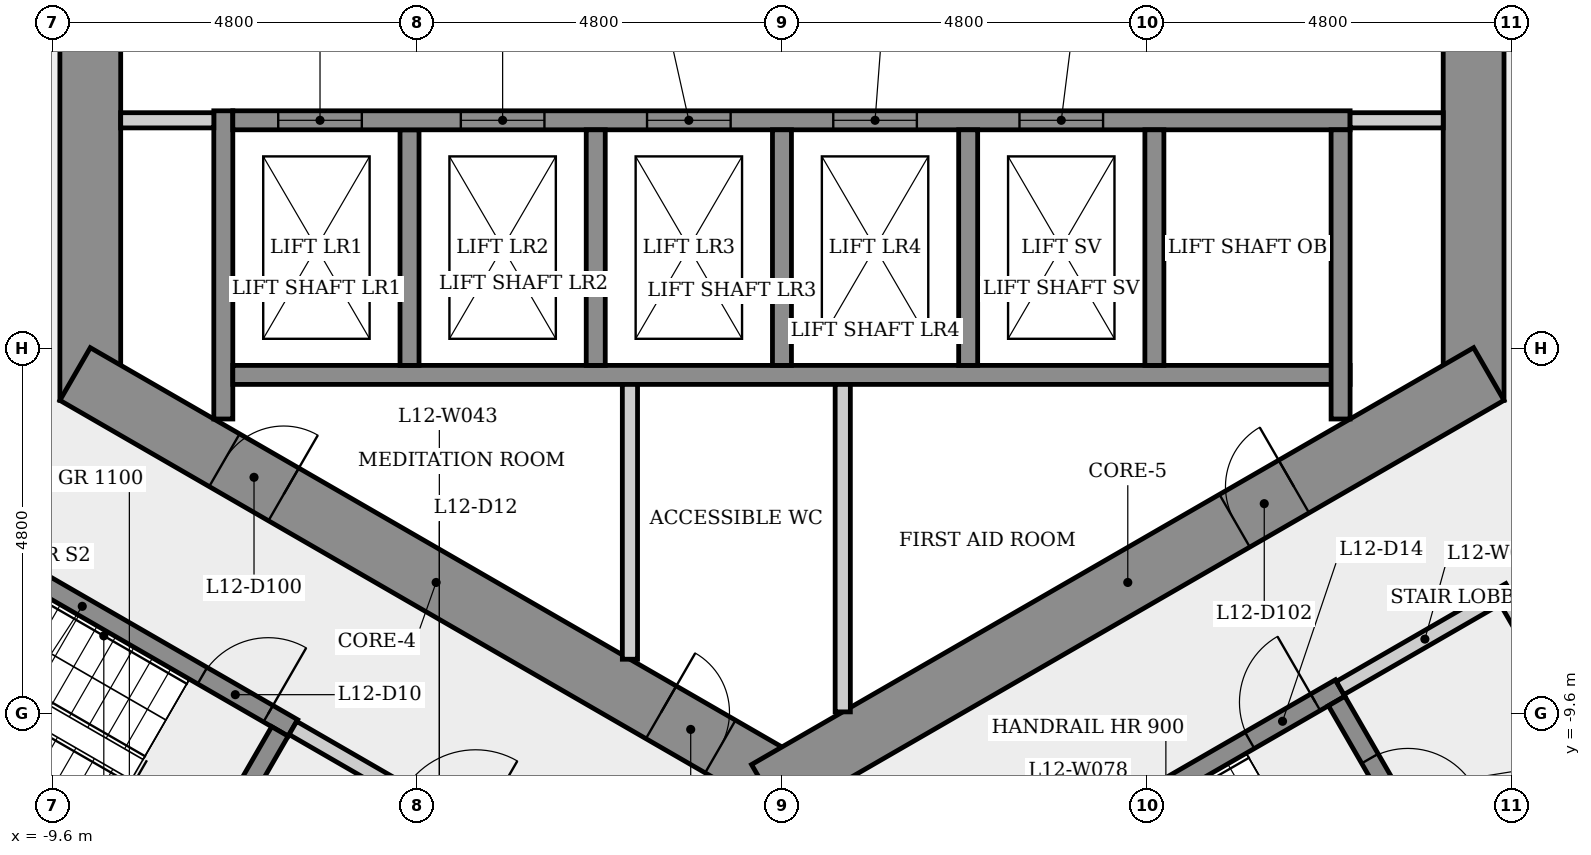
"""IFC4 building model, lengths in metres.
Left out: names, types, materials, properties, quantities, classifications, styles, units other than length and angle.
Written with IfcOpenShell. Run it as: python <this file> out.ifc"""

import sys

from ifc_helpers import new_model, si_unit, direction, frame, frame_2d, origin, place, context, subcontext, project, spatial, rectangle, extrude, element, fill, save


model = new_model("IFC4")
c1 = context("Model", 3, precision=1e-05, world=origin(), true_north=direction((0.0, 1.0)))
c2 = subcontext(c1, "Body", "Model", "MODEL_VIEW")
j1 = project(units=[si_unit("LENGTHUNIT", "METRE"), si_unit("PLANEANGLEUNIT", "RADIAN")], contexts=[c1])
p1 = place(None, origin())
s1 = spatial("IfcSite", under=j1, at=p1, CompositionType="ELEMENT")
p2 = place(p1, origin())
s2 = spatial("IfcBuilding", under=s1, at=p2, CompositionType="ELEMENT")
p3 = place(p2, frame((0.0, 0.0, 49.3)))
s3 = spatial("IfcBuildingStorey", under=s2, at=p3, CompositionType="ELEMENT", Elevation=49.3)
p4 = place(p3, frame((9.1, -5.485, 0.0), z_axis=(0.0, 0.0, 1.0), x_axis=(0.0, 1.0, 0.0)))
e1 = element("IfcWall", 1, at=p4, inside=s3, PredefinedType="SHEAR", context=c2, shape_type="SweptSolid", body=[
    extrude(rectangle(XDim=10.97, YDim=0.8, at=frame_2d((5.485, 0.0))), origin(), (0.0, 0.0, 1.0), 3.4),
])
p5 = place(p4, frame((4.685, 0.0, 0.0)))
e2 = element("IfcOpeningElement", 2, at=p5, cuts=e1, PredefinedType="OPENING", context=c2, shape_type="SweptSolid", body=[
    extrude(rectangle(XDim=1.6, YDim=2.1, at=frame_2d((0.8, 1.05))), frame((0.0, 0.41, 0.0), z_axis=(0.0, -1.0, 0.0), x_axis=(1.0, 0.0, 0.0)), (0.0, 0.0, 1.0), 0.82),
])
p6 = place(p3, frame((-9.1, 5.485, 0.0), z_axis=(0.0, 0.0, 1.0), x_axis=(0.0, -1.0, 0.0)))
e3 = element("IfcWall", 3, at=p6, inside=s3, PredefinedType="SHEAR", context=c2, shape_type="SweptSolid", body=[
    extrude(rectangle(XDim=10.97, YDim=0.8, at=frame_2d((5.485, 0.0))), origin(), (0.0, 0.0, 1.0), 3.4),
])
p7 = place(p6, frame((4.685, 0.0, 0.0)))
e4 = element("IfcOpeningElement", 4, at=p7, cuts=e3, PredefinedType="OPENING", context=c2, shape_type="SweptSolid", body=[
    extrude(rectangle(XDim=1.6, YDim=2.1, at=frame_2d((0.8, 1.05))), frame((0.0, 0.41, 0.0), z_axis=(0.0, -1.0, 0.0), x_axis=(1.0, 0.0, 0.0)), (0.0, 0.0, 1.0), 0.82),
])
p8 = place(p3, frame((-9.3, -5.138, 0.0), z_axis=(0.0, 0.0, 1.0), x_axis=(0.866023993627, -0.500002442456, 0.0)))
e5 = element("IfcWall", 5, at=p8, inside=s3, PredefinedType="SHEAR", context=c2, shape_type="SweptSolid", body=[
    extrude(rectangle(XDim=10.97, YDim=0.8, at=frame_2d((5.485, 0.0))), origin(), (0.0, 0.0, 1.0), 3.4),
])
p9 = place(p8, frame((2.268, 0.0, 0.0)))
e6 = element("IfcOpeningElement", 6, at=p9, cuts=e5, PredefinedType="OPENING", context=c2, shape_type="SweptSolid", body=[
    extrude(rectangle(XDim=0.9, YDim=2.1, at=frame_2d((0.45, 1.05))), frame((0.0, 0.41, 0.0), z_axis=(0.0, -1.0, 0.0), x_axis=(1.0, 0.0, 0.0)), (0.0, 0.0, 1.0), 0.82),
])
p10 = place(p8, frame((8.903, 0.0, 0.0)))
e7 = element("IfcOpeningElement", 7, at=p10, cuts=e5, PredefinedType="OPENING", context=c2, shape_type="SweptSolid", body=[
    extrude(rectangle(XDim=0.9, YDim=2.1, at=frame_2d((0.45, 1.05))), frame((0.0, 0.41, 0.0), z_axis=(0.0, -1.0, 0.0), x_axis=(1.0, 0.0, 0.0)), (0.0, 0.0, 1.0), 0.82),
])
p11 = place(p3, frame((-0.2, -10.623, 0.0), z_axis=(0.0, 0.0, 1.0), x_axis=(0.866023993627, 0.500002442456, 0.0)))
e8 = element("IfcWall", 8, at=p11, inside=s3, PredefinedType="SHEAR", context=c2, shape_type="SweptSolid", body=[
    extrude(rectangle(XDim=10.97, YDim=0.8, at=frame_2d((5.485, 0.0))), origin(), (0.0, 0.0, 1.0), 3.4),
])
p12 = place(p11, frame((7.108, 0.0, 0.0)))
e9 = element("IfcOpeningElement", 9, at=p12, cuts=e8, PredefinedType="OPENING", context=c2, shape_type="SweptSolid", body=[
    extrude(rectangle(XDim=0.9, YDim=2.1, at=frame_2d((0.45, 1.05))), frame((0.0, 0.41, 0.0), z_axis=(0.0, -1.0, 0.0), x_axis=(1.0, 0.0, 0.0)), (0.0, 0.0, 1.0), 0.82),
])
p13 = place(p3, frame((-11.977, -6.595, 0.0), z_axis=(0.0, 0.0, 1.0), x_axis=(0.866025499775, -0.499999833739, 0.0)))
e10 = element("IfcWall", 10, at=p13, inside=s3, PredefinedType="SHEAR", context=c2, shape_type="SweptSolid", body=[
    extrude(rectangle(XDim=6.4, YDim=0.25, at=frame_2d((3.2, 0.0))), origin(), (0.0, 0.0, 1.0), 3.05),
])
p14 = place(p13, frame((5.025, 0.0, 0.0)))
e11 = element("IfcOpeningElement", 11, at=p14, cuts=e10, PredefinedType="OPENING", context=c2, shape_type="SweptSolid", body=[
    extrude(rectangle(XDim=1.0, YDim=2.1, at=frame_2d((0.5, 1.05))), frame((0.0, 0.135, 0.0), z_axis=(0.0, -1.0, 0.0), x_axis=(1.0, 0.0, 0.0)), (0.0, 0.0, 1.0), 0.27),
])
p15 = place(p3, frame((-7.935, -12.393, 0.0), z_axis=(0.0, 0.0, 1.0), x_axis=(-0.866025499775, 0.499999833739, 0.0)))
e12 = element("IfcWall", 12, at=p15, inside=s3, PredefinedType="SHEAR", context=c2, shape_type="SweptSolid", body=[
    extrude(rectangle(XDim=6.4, YDim=0.25, at=frame_2d((3.2, 0.0))), origin(), (0.0, 0.0, 1.0), 3.05),
])
p16 = place(p3, frame((-7.35, -5.73, 0.0), z_axis=(0.0, 0.0, 1.0), x_axis=(0.0, 1.0, 0.0)))
e13 = element("IfcWall", 13, at=p16, inside=s3, PredefinedType="SHEAR", context=c2, shape_type="SweptSolid", body=[
    extrude(rectangle(XDim=4.055, YDim=0.25, at=frame_2d((2.028, 0.0))), origin(), (0.0, 0.0, 1.0), 3.05),
])
p17 = place(p3, frame((-7.475, -1.8, 0.0), z_axis=(0.0, 0.0, 1.0), x_axis=(-1.0, 0.0, 0.0)))
e14 = element("IfcWall", 14, at=p17, inside=s3, PredefinedType="PARTITIONING", context=c2, shape_type="SweptSolid", body=[
    extrude(rectangle(XDim=1.225, YDim=0.2, at=frame_2d((0.613, 0.0))), origin(), (0.0, 0.0, 1.0), 3.05),
])
p18 = place(p3, frame((-6.605, -9.841, 0.0), z_axis=(0.0, 0.0, 1.0), x_axis=(-0.499996545922, -0.866027397988, 0.0)))
e15 = element("IfcWall", 15, at=p18, inside=s3, PredefinedType="SHEAR", context=c2, shape_type="SweptSolid", body=[
    extrude(rectangle(XDim=2.75, YDim=0.25, at=frame_2d((1.375, 0.0))), origin(), (0.0, 0.0, 1.0), 3.05),
])
p19 = place(p18, frame((0.875, 0.0, 0.0)))
e16 = element("IfcOpeningElement", 16, at=p19, cuts=e15, PredefinedType="OPENING", context=c2, shape_type="SweptSolid", body=[
    extrude(rectangle(XDim=1.0, YDim=2.1, at=frame_2d((0.5, 1.05))), frame((0.0, 0.135, 0.0), z_axis=(0.0, -1.0, 0.0), x_axis=(1.0, 0.0, 0.0)), (0.0, 0.0, 1.0), 0.27),
])
p20 = place(p3, frame((-6.435, -9.795, 0.0), z_axis=(0.0, 0.0, 1.0), x_axis=(0.866012907634, -0.500021643343, 0.0)))
e17 = element("IfcWall", 17, at=p20, inside=s3, PredefinedType="PARTITIONING", context=c2, shape_type="SweptSolid", body=[
    extrude(rectangle(XDim=4.45, YDim=0.2, at=frame_2d((2.225, 0.0))), origin(), (0.0, 0.0, 1.0), 3.05),
])
p21 = place(p20, frame((1.675, 0.0, 0.0)))
e18 = element("IfcOpeningElement", 18, at=p21, cuts=e17, PredefinedType="OPENING", context=c2, shape_type="SweptSolid", body=[
    extrude(rectangle(XDim=1.1, YDim=2.1, at=frame_2d((0.55, 1.05))), frame((0.0, 0.11, 0.0), z_axis=(0.0, -1.0, 0.0), x_axis=(1.0, 0.0, 0.0)), (0.0, 0.0, 1.0), 0.22),
])
p22 = place(p3, frame((-7.225, -5.15, 0.0), z_axis=(0.0, 0.0, 1.0), x_axis=(1.0, 0.0, 0.0)))
e19 = element("IfcWall", 19, at=p22, inside=s3, PredefinedType="SHEAR", context=c2, shape_type="SweptSolid", body=[
    extrude(rectangle(XDim=14.7, YDim=0.25, at=frame_2d((7.35, 0.0))), origin(), (0.0, 0.0, 1.0), 3.05),
])
p23 = place(p3, frame((-4.9, -1.925, 0.0), z_axis=(0.0, 0.0, 1.0), x_axis=(0.0, -1.0, 0.0)))
e20 = element("IfcWall", 20, at=p23, inside=s3, PredefinedType="SHEAR", context=c2, shape_type="SweptSolid", body=[
    extrude(rectangle(XDim=3.1, YDim=0.25, at=frame_2d((1.55, 0.0))), origin(), (0.0, 0.0, 1.0), 3.4),
])
p24 = place(p3, frame((-7.225, -1.8, 0.0), z_axis=(0.0, 0.0, 1.0), x_axis=(1.0, 0.0, 0.0)))
e21 = element("IfcWall", 21, at=p24, inside=s3, PredefinedType="SHEAR", context=c2, shape_type="SweptSolid", body=[
    extrude(rectangle(XDim=14.7, YDim=0.25, at=frame_2d((7.35, 0.0))), origin(), (0.0, 0.0, 1.0), 3.05),
])
p25 = place(p24, frame((0.597, 0.0, 0.0)))
e22 = element("IfcOpeningElement", 22, at=p25, cuts=e21, PredefinedType="OPENING", context=c2, shape_type="SweptSolid", body=[
    extrude(rectangle(XDim=1.1, YDim=2.1, at=frame_2d((0.55, 1.05))), frame((0.0, 0.135, 0.0), z_axis=(0.0, -1.0, 0.0), x_axis=(1.0, 0.0, 0.0)), (0.0, 0.0, 1.0), 0.27),
])
p26 = place(p24, frame((3.0, 0.0, 0.0)))
e23 = element("IfcOpeningElement", 23, at=p26, cuts=e21, PredefinedType="OPENING", context=c2, shape_type="SweptSolid", body=[
    extrude(rectangle(XDim=1.1, YDim=2.1, at=frame_2d((0.55, 1.05))), frame((0.0, 0.135, 0.0), z_axis=(0.0, -1.0, 0.0), x_axis=(1.0, 0.0, 0.0)), (0.0, 0.0, 1.0), 0.27),
])
p27 = place(p24, frame((5.45, 0.0, 0.0)))
e24 = element("IfcOpeningElement", 24, at=p27, cuts=e21, PredefinedType="OPENING", context=c2, shape_type="SweptSolid", body=[
    extrude(rectangle(XDim=1.1, YDim=2.1, at=frame_2d((0.55, 1.05))), frame((0.0, 0.135, 0.0), z_axis=(0.0, -1.0, 0.0), x_axis=(1.0, 0.0, 0.0)), (0.0, 0.0, 1.0), 0.27),
])
p28 = place(p24, frame((7.9, 0.0, 0.0)))
e25 = element("IfcOpeningElement", 25, at=p28, cuts=e21, PredefinedType="OPENING", context=c2, shape_type="SweptSolid", body=[
    extrude(rectangle(XDim=1.1, YDim=2.1, at=frame_2d((0.55, 1.05))), frame((0.0, 0.135, 0.0), z_axis=(0.0, -1.0, 0.0), x_axis=(1.0, 0.0, 0.0)), (0.0, 0.0, 1.0), 0.27),
])
p29 = place(p24, frame((10.35, 0.0, 0.0)))
e26 = element("IfcOpeningElement", 26, at=p29, cuts=e21, PredefinedType="OPENING", context=c2, shape_type="SweptSolid", body=[
    extrude(rectangle(XDim=1.1, YDim=2.1, at=frame_2d((0.55, 1.05))), frame((0.0, 0.135, 0.0), z_axis=(0.0, -1.0, 0.0), x_axis=(1.0, 0.0, 0.0)), (0.0, 0.0, 1.0), 0.27),
])
p30 = place(p3, frame((-2.45, -1.925, 0.0), z_axis=(0.0, 0.0, 1.0), x_axis=(0.0, -1.0, 0.0)))
e27 = element("IfcWall", 27, at=p30, inside=s3, PredefinedType="SHEAR", context=c2, shape_type="SweptSolid", body=[
    extrude(rectangle(XDim=3.1, YDim=0.25, at=frame_2d((1.55, 0.0))), origin(), (0.0, 0.0, 1.0), 3.4),
])
p31 = place(p3, frame((-2.0, -5.275, 0.0), z_axis=(0.0, 0.0, 1.0), x_axis=(0.0, -1.0, 0.0)))
e28 = element("IfcWall", 28, at=p31, inside=s3, PredefinedType="PARTITIONING", context=c2, shape_type="SweptSolid", body=[
    extrude(rectangle(XDim=3.616, YDim=0.2, at=frame_2d((1.808, 0.0))), origin(), (0.0, 0.0, 1.0), 3.05),
])
p32 = place(p3, frame((0.0, -1.925, 0.0), z_axis=(0.0, 0.0, 1.0), x_axis=(0.0, -1.0, 0.0)))
e29 = element("IfcWall", 29, at=p32, inside=s3, PredefinedType="SHEAR", context=c2, shape_type="SweptSolid", body=[
    extrude(rectangle(XDim=3.1, YDim=0.25, at=frame_2d((1.55, 0.0))), origin(), (0.0, 0.0, 1.0), 3.4),
])
p33 = place(p3, frame((0.8, -5.275, 0.0), z_axis=(0.0, 0.0, 1.0), x_axis=(0.0, -1.0, 0.0)))
e30 = element("IfcWall", 30, at=p33, inside=s3, PredefinedType="PARTITIONING", context=c2, shape_type="SweptSolid", body=[
    extrude(rectangle(XDim=4.309, YDim=0.2, at=frame_2d((2.155, 0.0))), origin(), (0.0, 0.0, 1.0), 3.05),
])
p34 = place(p3, frame((1.585, -12.595, 0.0), z_axis=(0.0, 0.0, 1.0), x_axis=(0.866036417653, 0.499980922934, 0.0)))
e31 = element("IfcWall", 31, at=p34, inside=s3, PredefinedType="SHEAR", context=c2, shape_type="SweptSolid", body=[
    extrude(rectangle(XDim=6.65, YDim=0.25, at=frame_2d((3.325, 0.0))), origin(), (0.0, 0.0, 1.0), 3.05),
])
p35 = place(p34, frame((5.275, 0.0, 0.0)))
e32 = element("IfcOpeningElement", 32, at=p35, cuts=e31, PredefinedType="OPENING", context=c2, shape_type="SweptSolid", body=[
    extrude(rectangle(XDim=1.0, YDim=2.1, at=frame_2d((0.5, 1.05))), frame((0.0, 0.135, 0.0), z_axis=(0.0, -1.0, 0.0), x_axis=(1.0, 0.0, 0.0)), (0.0, 0.0, 1.0), 0.27),
])
for number, where, z_axis, x_axis in (
    (33, (2.45, -1.925, 0.0), (0.0, 0.0, 1.0), (0.0, -1.0, 0.0)),
    (34, (4.9, -1.925, 0.0), (0.0, 0.0, 1.0), (0.0, -1.0, 0.0)),
):
    element("IfcWall", number, at=place(p3, frame(where, z_axis=z_axis, x_axis=x_axis)), inside=s3, PredefinedType="SHEAR", context=c2, shape_type="SweptSolid", body=[
        extrude(rectangle(XDim=3.1, YDim=0.25, at=frame_2d((1.55, 0.0))), origin(), (0.0, 0.0, 1.0), 3.4),
    ])
p36 = place(p3, frame((7.298, -9.441, 0.0), z_axis=(0.0, 0.0, 1.0), x_axis=(0.500034990121, -0.866005201286, 0.0)))
e35 = element("IfcWall", 35, at=p36, inside=s3, PredefinedType="SHEAR", context=c2, shape_type="SweptSolid", body=[
    extrude(rectangle(XDim=2.75, YDim=0.25, at=frame_2d((1.375, 0.0))), origin(), (0.0, 0.0, 1.0), 3.05),
])
p37 = place(p36, frame((0.875, 0.0, 0.0)))
e36 = element("IfcOpeningElement", 36, at=p37, cuts=e35, PredefinedType="OPENING", context=c2, shape_type="SweptSolid", body=[
    extrude(rectangle(XDim=1.0, YDim=2.1, at=frame_2d((0.5, 1.05))), frame((0.0, 0.135, 0.0), z_axis=(0.0, -1.0, 0.0), x_axis=(1.0, 0.0, 0.0)), (0.0, 0.0, 1.0), 0.27),
])
p38 = place(p3, frame((7.344, -9.27, 0.0), z_axis=(0.0, 0.0, 1.0), x_axis=(0.866005588531, 0.500034319456, 0.0)))
e37 = element("IfcWall", 37, at=p38, inside=s3, PredefinedType="PARTITIONING", context=c2, shape_type="SweptSolid", body=[
    extrude(rectangle(XDim=2.575, YDim=0.2, at=frame_2d((1.288, 0.0))), origin(), (0.0, 0.0, 1.0), 3.05),
])
p39 = place(p3, frame((7.35, -1.925, 0.0), z_axis=(0.0, 0.0, 1.0), x_axis=(0.0, -1.0, 0.0)))
e38 = element("IfcWall", 38, at=p39, inside=s3, PredefinedType="SHEAR", context=c2, shape_type="SweptSolid", body=[
    extrude(rectangle(XDim=3.805, YDim=0.25, at=frame_2d((1.903, 0.0))), origin(), (0.0, 0.0, 1.0), 3.05),
])
p40 = place(p3, frame((8.7, -1.8, 0.0), z_axis=(0.0, 0.0, 1.0), x_axis=(-1.0, 0.0, 0.0)))
e39 = element("IfcWall", 39, at=p40, inside=s3, PredefinedType="PARTITIONING", context=c2, shape_type="SweptSolid", body=[
    extrude(rectangle(XDim=1.225, YDim=0.2, at=frame_2d((0.613, 0.0))), origin(), (0.0, 0.0, 1.0), 3.05),
])
p41 = place(p3, frame((9.537, -8.119, 0.0), z_axis=(0.0, 0.0, 1.0), x_axis=(0.499990139034, -0.866031096941, 0.0)))
e40 = element("IfcWall", 40, at=p41, inside=s3, PredefinedType="PARTITIONING", context=c2, shape_type="SweptSolid", body=[
    extrude(rectangle(XDim=3.0, YDim=0.2, at=frame_2d((1.5, 0.0))), origin(), (0.0, 0.0, 1.0), 3.05),
])
p42 = place(p41, frame((0.935, 0.0, 0.0)))
e41 = element("IfcOpeningElement", 41, at=p42, cuts=e40, PredefinedType="OPENING", context=c2, shape_type="SweptSolid", body=[
    extrude(rectangle(XDim=1.0, YDim=2.1, at=frame_2d((0.5, 1.05))), frame((0.0, 0.11, 0.0), z_axis=(0.0, -1.0, 0.0), x_axis=(1.0, 0.0, 0.0)), (0.0, 0.0, 1.0), 0.22),
])
p43 = place(p25, origin())
e42 = element("IfcDoor", 42, at=p43, inside=s3, OperationType="SLIDING_TO_LEFT", PredefinedType="DOOR", context=c2, shape_type="SweptSolid", body=[
    extrude(rectangle(XDim=1.1, YDim=2.1, at=frame_2d((0.55, 1.05))), frame((0.0, 0.025, 0.0), z_axis=(0.0, -1.0, 0.0), x_axis=(1.0, 0.0, 0.0)), (0.0, 0.0, 1.0), 0.05),
])
fill(e22, e42)
p44 = place(p26, origin())
e43 = element("IfcDoor", 43, at=p44, inside=s3, OperationType="SLIDING_TO_LEFT", PredefinedType="DOOR", context=c2, shape_type="SweptSolid", body=[
    extrude(rectangle(XDim=1.1, YDim=2.1, at=frame_2d((0.55, 1.05))), frame((0.0, 0.025, 0.0), z_axis=(0.0, -1.0, 0.0), x_axis=(1.0, 0.0, 0.0)), (0.0, 0.0, 1.0), 0.05),
])
fill(e23, e43)
p45 = place(p27, origin())
e44 = element("IfcDoor", 44, at=p45, inside=s3, OperationType="SLIDING_TO_LEFT", PredefinedType="DOOR", context=c2, shape_type="SweptSolid", body=[
    extrude(rectangle(XDim=1.1, YDim=2.1, at=frame_2d((0.55, 1.05))), frame((0.0, 0.025, 0.0), z_axis=(0.0, -1.0, 0.0), x_axis=(1.0, 0.0, 0.0)), (0.0, 0.0, 1.0), 0.05),
])
fill(e24, e44)
p46 = place(p28, origin())
e45 = element("IfcDoor", 45, at=p46, inside=s3, OperationType="SLIDING_TO_LEFT", PredefinedType="DOOR", context=c2, shape_type="SweptSolid", body=[
    extrude(rectangle(XDim=1.1, YDim=2.1, at=frame_2d((0.55, 1.05))), frame((0.0, 0.025, 0.0), z_axis=(0.0, -1.0, 0.0), x_axis=(1.0, 0.0, 0.0)), (0.0, 0.0, 1.0), 0.05),
])
fill(e25, e45)
p47 = place(p29, origin())
e46 = element("IfcDoor", 46, at=p47, inside=s3, OperationType="SLIDING_TO_LEFT", PredefinedType="DOOR", context=c2, shape_type="SweptSolid", body=[
    extrude(rectangle(XDim=1.1, YDim=2.1, at=frame_2d((0.55, 1.05))), frame((0.0, 0.025, 0.0), z_axis=(0.0, -1.0, 0.0), x_axis=(1.0, 0.0, 0.0)), (0.0, 0.0, 1.0), 0.05),
])
fill(e26, e46)
p48 = place(p14, origin())
e47 = element("IfcDoor", 47, at=p48, inside=s3, OperationType="SINGLE_SWING_RIGHT", PredefinedType="DOOR", context=c2, shape_type="SweptSolid", body=[
    extrude(rectangle(XDim=1.0, YDim=2.1, at=frame_2d((0.5, 1.05))), frame((0.0, 0.025, 0.0), z_axis=(0.0, -1.0, 0.0), x_axis=(1.0, 0.0, 0.0)), (0.0, 0.0, 1.0), 0.05),
])
fill(e11, e47)
p49 = place(p35, origin())
e48 = element("IfcDoor", 48, at=p49, inside=s3, OperationType="SINGLE_SWING_RIGHT", PredefinedType="DOOR", context=c2, shape_type="SweptSolid", body=[
    extrude(rectangle(XDim=1.0, YDim=2.1, at=frame_2d((0.5, 1.05))), frame((0.0, 0.025, 0.0), z_axis=(0.0, -1.0, 0.0), x_axis=(1.0, 0.0, 0.0)), (0.0, 0.0, 1.0), 0.05),
])
fill(e32, e48)
p50 = place(p37, origin())
e49 = element("IfcDoor", 49, at=p50, inside=s3, OperationType="SINGLE_SWING_RIGHT", PredefinedType="DOOR", context=c2, shape_type="SweptSolid", body=[
    extrude(rectangle(XDim=1.0, YDim=2.1, at=frame_2d((0.5, 1.05))), frame((0.0, 0.025, 0.0), z_axis=(0.0, -1.0, 0.0), x_axis=(1.0, 0.0, 0.0)), (0.0, 0.0, 1.0), 0.05),
])
fill(e36, e49)
p51 = place(p9, origin())
e50 = element("IfcDoor", 50, at=p51, inside=s3, OperationType="SINGLE_SWING_RIGHT", PredefinedType="DOOR", context=c2, shape_type="SweptSolid", body=[
    extrude(rectangle(XDim=0.9, YDim=2.1, at=frame_2d((0.45, 1.05))), frame((0.0, 0.025, 0.0), z_axis=(0.0, -1.0, 0.0), x_axis=(1.0, 0.0, 0.0)), (0.0, 0.0, 1.0), 0.05),
])
fill(e6, e50)
p52 = place(p10, origin())
e51 = element("IfcDoor", 51, at=p52, inside=s3, OperationType="SINGLE_SWING_LEFT", PredefinedType="DOOR", context=c2, shape_type="SweptSolid", body=[
    extrude(rectangle(XDim=0.9, YDim=2.1, at=frame_2d((0.45, 1.05))), frame((0.0, 0.025, 0.0), z_axis=(0.0, -1.0, 0.0), x_axis=(1.0, 0.0, 0.0)), (0.0, 0.0, 1.0), 0.05),
])
fill(e7, e51)
p53 = place(p12, origin())
e52 = element("IfcDoor", 52, at=p53, inside=s3, OperationType="SINGLE_SWING_RIGHT", PredefinedType="DOOR", context=c2, shape_type="SweptSolid", body=[
    extrude(rectangle(XDim=0.9, YDim=2.1, at=frame_2d((0.45, 1.05))), frame((0.0, 0.025, 0.0), z_axis=(0.0, -1.0, 0.0), x_axis=(1.0, 0.0, 0.0)), (0.0, 0.0, 1.0), 0.05),
])
fill(e9, e52)
save(model, sys.argv[1])
